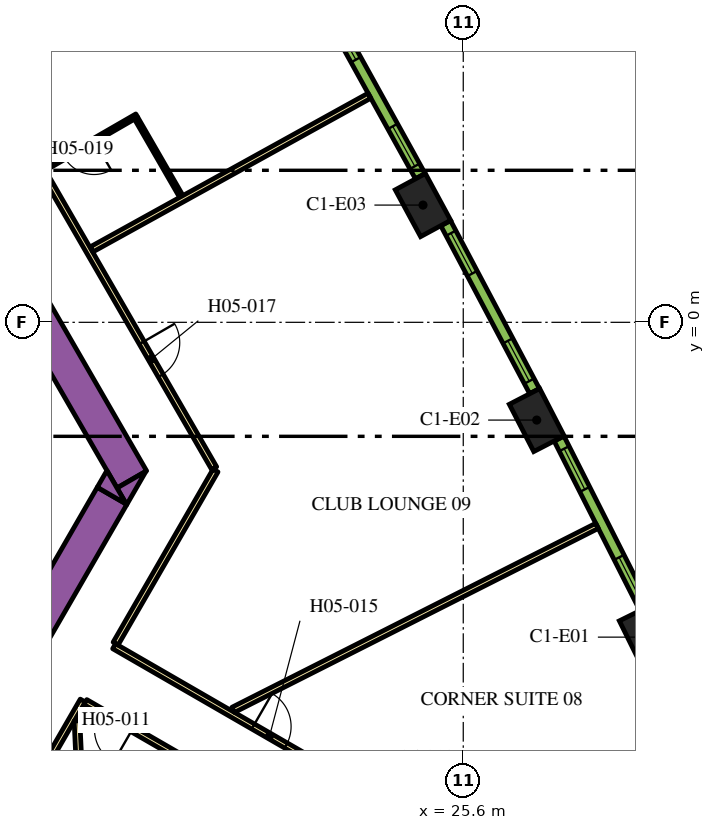
"""IFC4 building model, lengths in metres.
Left out: names, types, materials, properties, quantities, classifications, styles, units other than length and angle.
Written with IfcOpenShell. Run it as: python <this file> out.ifc"""

import sys

from ifc_helpers import new_model, si_unit, direction, frame, frame_2d, origin, origin_2d, place, context, subcontext, project, spatial, polyline, rectangle, outline, extrude, element, fill, save


model = new_model("IFC4")
c1 = context("Model", 3, precision=1e-05, world=origin(), true_north=direction((0.0, 1.0)))
c2 = subcontext(c1, "Body", "Model", "MODEL_VIEW")
j1 = project(units=[si_unit("LENGTHUNIT", "METRE"), si_unit("PLANEANGLEUNIT", "RADIAN")], contexts=[c1])
p1 = place(None, origin())
s1 = spatial("IfcSite", under=j1, at=p1, CompositionType="ELEMENT")
p2 = place(p1, origin())
s2 = spatial("IfcBuilding", under=s1, at=p2, CompositionType="ELEMENT")
p3 = place(p2, frame((0.0, 0.0, 74.4)))
s3 = spatial("IfcBuildingStorey", under=s2, at=p3, CompositionType="ELEMENT", Elevation=74.4)
for number, where, z_axis, x_axis in (
    (1, (30.421, -8.284, 0.0), (0.0, 0.0, 1.0), (-0.443, 0.897, 0.0)),
    (2, (27.533, -2.572, 0.0), (0.0, 0.0, 1.0), (-0.459, 0.888, 0.0)),
    (3, (24.54, 3.085, 0.0), (0.0, 0.0, 1.0), (-0.476, 0.88, 0.0)),
):
    element("IfcColumn", number, at=place(p3, frame(where, z_axis=z_axis, x_axis=x_axis)), inside=s3, PredefinedType="COLUMN", context=c2, shape_type="SweptSolid", body=[
        extrude(rectangle(XDim=1.4, YDim=0.9, at=origin_2d()), origin(), (0.0, 0.0, 1.0), 3.9),
    ])
p4 = place(p3, frame((6.461, 13.909, 0.0), z_axis=(0.0, 0.0, 1.0), x_axis=(0.500005804227, -0.866022052686, 0.0)))
e4 = element("IfcWall", 4, at=p4, inside=s3, PredefinedType="SOLIDWALL", context=c2, shape_type="SweptSolid", body=[
    extrude(rectangle(XDim=20.834, YDim=0.9, at=frame_2d((10.417, 0.0))), origin(), (0.0, 0.0, 1.0), 3.9),
])
p5 = place(p3, origin())
e5 = element("IfcWall", 5, at=p5, inside=s3, PredefinedType="SOLIDWALL", context=c2, shape_type="SweptSolid", body=[
    extrude(outline(polyline([(16.743, -4.8), (16.489, -4.36), (17.251, -3.92), (16.743, -4.8)])), origin(), (0.0, 0.0, 1.0), 3.9),
])
p6 = place(p3, frame((11.695, -12.644, 0.0), z_axis=(0.0, 0.0, 1.0), x_axis=(0.500010229568, 0.86601949766, 0.0)))
e6 = element("IfcWall", 6, at=p6, inside=s3, PredefinedType="SOLIDWALL", context=c2, shape_type="SweptSolid", body=[
    extrude(rectangle(XDim=9.326, YDim=0.9, at=frame_2d((4.663, 0.0))), origin(), (0.0, 0.0, 1.0), 3.9),
])
e7 = element("IfcWall", 7, at=p5, inside=s3, PredefinedType="SOLIDWALL", context=c2, shape_type="SweptSolid", body=[
    extrude(outline(polyline([(16.223, -3.9), (16.732, -4.78), (15.969, -4.34), (16.223, -3.9)])), origin(), (0.0, 0.0, 1.0), 3.9),
])
p7 = place(p3, frame((16.412, -8.523, 0.0), z_axis=(0.0, 0.0, 1.0), x_axis=(0.866022197818, -0.500005552856, 0.0)))
e8 = element("IfcWall", 8, at=p7, inside=s3, PredefinedType="PARTITIONING", context=c2, shape_type="SweptSolid", body=[
    extrude(rectangle(XDim=16.224, YDim=0.15, at=frame_2d((8.112, 0.0))), origin(), (0.0, 0.0, 1.0), 2.7),
])
p8 = place(p7, frame((4.223, 0.0, 0.0)))
e9 = element("IfcOpeningElement", 9, at=p8, cuts=e8, PredefinedType="OPENING", context=c2, shape_type="SweptSolid", body=[
    extrude(rectangle(XDim=1.0, YDim=2.1, at=frame_2d((0.5, 1.05))), frame((0.0, 0.085, 0.0), z_axis=(0.0, -1.0, 0.0), x_axis=(1.0, 0.0, 0.0)), (0.0, 0.0, 1.0), 0.17),
])
p9 = place(p3, frame((19.081, -3.9, 0.0), z_axis=(0.0, 0.0, 1.0), x_axis=(-0.499974327079, -0.866040225545, 0.0)))
e10 = element("IfcWall", 10, at=p9, inside=s3, PredefinedType="PARTITIONING", context=c2, shape_type="SweptSolid", body=[
    extrude(rectangle(XDim=5.258, YDim=0.15, at=frame_2d((2.629, 0.0))), origin(), (0.0, 0.0, 1.0), 2.7),
])
p10 = place(p3, frame((6.163, 18.475, 0.0), z_axis=(0.0, 0.0, 1.0), x_axis=(0.500001317485, -0.866024643133, 0.0)))
e11 = element("IfcWall", 11, at=p10, inside=s3, PredefinedType="PARTITIONING", context=c2, shape_type="SweptSolid", body=[
    extrude(rectangle(XDim=25.767, YDim=0.15, at=frame_2d((12.883, 0.0))), origin(), (0.0, 0.0, 1.0), 2.7),
])
p11 = place(p10, frame((21.953, 0.0, 0.0)))
e12 = element("IfcOpeningElement", 12, at=p11, cuts=e11, PredefinedType="OPENING", context=c2, shape_type="SweptSolid", body=[
    extrude(rectangle(XDim=1.0, YDim=2.1, at=frame_2d((0.5, 1.05))), frame((0.0, 0.085, 0.0), z_axis=(0.0, -1.0, 0.0), x_axis=(1.0, 0.0, 0.0)), (0.0, 0.0, 1.0), 0.17),
])
p12 = place(p10, frame((9.948, 0.0, 0.0)))
e13 = element("IfcOpeningElement", 13, at=p12, cuts=e11, PredefinedType="OPENING", context=c2, shape_type="SweptSolid", body=[
    extrude(rectangle(XDim=1.0, YDim=2.1, at=frame_2d((0.5, 1.05))), frame((0.0, 0.085, 0.0), z_axis=(0.0, -1.0, 0.0), x_axis=(1.0, 0.0, 0.0)), (0.0, 0.0, 1.0), 0.17),
])
p13 = place(p10, frame((8.641, 0.0, 0.0)))
e14 = element("IfcOpeningElement", 14, at=p13, cuts=e11, PredefinedType="OPENING", context=c2, shape_type="SweptSolid", body=[
    extrude(rectangle(XDim=1.0, YDim=2.1, at=frame_2d((0.5, 1.05))), frame((0.0, 0.085, 0.0), z_axis=(0.0, -1.0, 0.0), x_axis=(1.0, 0.0, 0.0)), (0.0, 0.0, 1.0), 0.17),
])
p14 = place(p3, frame((15.587, -9.952, 0.0), z_axis=(0.0, 0.0, 1.0), x_axis=(-0.500016618951, -0.866015808616, 0.0)))
e15 = element("IfcWall", 15, at=p14, inside=s3, PredefinedType="PARTITIONING", context=c2, shape_type="SweptSolid", body=[
    extrude(rectangle(XDim=5.268, YDim=0.15, at=frame_2d((2.634, 0.0))), origin(), (0.0, 0.0, 1.0), 2.7),
])
p15 = place(p3, frame((29.638, -18.064, 0.0), z_axis=(0.0, 0.0, 1.0), x_axis=(-0.866026175601, 0.499998663172, 0.0)))
e16 = element("IfcWall", 16, at=p15, inside=s3, PredefinedType="PARTITIONING", context=c2, shape_type="SweptSolid", body=[
    extrude(rectangle(XDim=16.144, YDim=0.15, at=frame_2d((8.072, 0.0))), origin(), (0.0, 0.0, 1.0), 2.7),
])
p16 = place(p15, frame((14.714, 0.0, 0.0)))
e17 = element("IfcOpeningElement", 17, at=p16, cuts=e16, PredefinedType="OPENING", context=c2, shape_type="SweptSolid", body=[
    extrude(rectangle(XDim=1.0, YDim=2.1, at=frame_2d((0.5, 1.05))), frame((0.0, 0.085, 0.0), z_axis=(0.0, -1.0, 0.0), x_axis=(1.0, 0.0, 0.0)), (0.0, 0.0, 1.0), 0.17),
])
p17 = place(p15, frame((7.275, 0.0, 0.0)))
e18 = element("IfcOpeningElement", 18, at=p17, cuts=e16, PredefinedType="OPENING", context=c2, shape_type="SweptSolid", body=[
    extrude(rectangle(XDim=1.0, YDim=2.1, at=frame_2d((0.5, 1.05))), frame((0.0, 0.085, 0.0), z_axis=(0.0, -1.0, 0.0), x_axis=(1.0, 0.0, 0.0)), (0.0, 0.0, 1.0), 0.17),
])
p18 = place(p3, frame((15.973, -22.109, 0.0), z_axis=(0.0, 0.0, 1.0), x_axis=(-0.046191717129, 0.998932592955, 0.0)))
e19 = element("IfcWall", 19, at=p18, inside=s3, PredefinedType="PARTITIONING", context=c2, shape_type="SweptSolid", body=[
    extrude(rectangle(XDim=11.638, YDim=0.15, at=frame_2d((5.819, 0.0))), origin(), (0.0, 0.0, 1.0), 2.7),
])
p19 = place(p3, frame((23.132, 5.962, 0.0), z_axis=(0.0, 0.0, 1.0), x_axis=(-0.875121716713, -0.483902863121, 0.0)))
e20 = element("IfcWall", 20, at=p19, inside=s3, PredefinedType="PARTITIONING", context=c2, shape_type="SweptSolid", body=[
    extrude(rectangle(XDim=8.355, YDim=0.15, at=frame_2d((4.178, 0.0))), origin(), (0.0, 0.0, 1.0), 2.7),
])
p20 = place(p3, frame((29.12, -5.356, 0.0), z_axis=(0.0, 0.0, 1.0), x_axis=(-0.892401965553, -0.451241323327, 0.0)))
e21 = element("IfcWall", 21, at=p20, inside=s3, PredefinedType="PARTITIONING", context=c2, shape_type="SweptSolid", body=[
    extrude(rectangle(XDim=10.729, YDim=0.15, at=frame_2d((5.364, 0.0))), origin(), (0.0, 0.0, 1.0), 2.7),
])
p21 = place(p3, frame((17.009, 5.439, 0.0), z_axis=(0.0, 0.0, 1.0), x_axis=(-0.865996816683, -0.500049511043, 0.0)))
e22 = element("IfcWall", 22, at=p21, inside=s3, PredefinedType="PARTITIONING", context=c2, shape_type="SweptSolid", body=[
    extrude(rectangle(XDim=2.8, YDim=0.1, at=frame_2d((1.4, 0.0))), origin(), (0.0, 0.0, 1.0), 2.7),
])
p22 = place(p21, frame((1.3, 0.0, 0.0)))
e23 = element("IfcOpeningElement", 23, at=p22, cuts=e22, PredefinedType="OPENING", context=c2, shape_type="SweptSolid", body=[
    extrude(rectangle(XDim=0.9, YDim=2.1, at=frame_2d((0.45, 1.05))), frame((0.0, 0.06, 0.0), z_axis=(0.0, -1.0, 0.0), x_axis=(1.0, 0.0, 0.0)), (0.0, 0.0, 1.0), 0.12),
])
p23 = place(p3, frame((16.991, 5.371, 0.0), z_axis=(0.0, 0.0, 1.0), x_axis=(0.499939447199, -0.866060361138, 0.0)))
e24 = element("IfcWall", 24, at=p23, inside=s3, PredefinedType="PARTITIONING", context=c2, shape_type="SweptSolid", body=[
    extrude(rectangle(XDim=2.37, YDim=0.1, at=frame_2d((1.185, 0.0))), origin(), (0.0, 0.0, 1.0), 2.7),
])
p24 = place(p3, frame((30.377, -7.521, 0.0), z_axis=(0.0, 0.0, 1.0), x_axis=(-0.451233929645, 0.892405704115, 0.0)))
e25 = element("IfcWall", 25, at=p24, inside=s3, PredefinedType="SOLIDWALL", context=c2, shape_type="SweptSolid", body=[
    extrude(rectangle(XDim=4.998, YDim=0.29, at=frame_2d((2.499, 0.0))), origin(), (0.0, 0.0, 1.0), 3.6),
])
p25 = place(p24, frame((0.297, 0.0, 0.9)))
e26 = element("IfcOpeningElement", 26, at=p25, cuts=e25, PredefinedType="OPENING", context=c2, shape_type="SweptSolid", body=[
    extrude(rectangle(XDim=1.2, YDim=2.15, at=frame_2d((0.6, 1.075))), frame((0.0, 0.155, 0.0), z_axis=(0.0, -1.0, 0.0), x_axis=(1.0, 0.0, 0.0)), (0.0, 0.0, 1.0), 0.31),
])
p26 = place(p24, frame((3.501, 0.0, 0.9)))
e27 = element("IfcOpeningElement", 27, at=p26, cuts=e25, PredefinedType="OPENING", context=c2, shape_type="SweptSolid", body=[
    extrude(rectangle(XDim=1.2, YDim=2.15, at=frame_2d((0.6, 1.075))), frame((0.0, 0.155, 0.0), z_axis=(0.0, -1.0, 0.0), x_axis=(1.0, 0.0, 0.0)), (0.0, 0.0, 1.0), 0.31),
])
p27 = place(p3, frame((27.475, -1.81, 0.0), z_axis=(0.0, 0.0, 1.0), x_axis=(-0.467629620899, 0.883924509026, 0.0)))
e28 = element("IfcWall", 28, at=p27, inside=s3, PredefinedType="SOLIDWALL", context=c2, shape_type="SweptSolid", body=[
    extrude(rectangle(XDim=4.998, YDim=0.29, at=frame_2d((2.499, 0.0))), origin(), (0.0, 0.0, 1.0), 3.6),
])
p28 = place(p27, frame((0.297, 0.0, 0.9)))
e29 = element("IfcOpeningElement", 29, at=p28, cuts=e28, PredefinedType="OPENING", context=c2, shape_type="SweptSolid", body=[
    extrude(rectangle(XDim=1.2, YDim=2.15, at=frame_2d((0.6, 1.075))), frame((0.0, 0.155, 0.0), z_axis=(0.0, -1.0, 0.0), x_axis=(1.0, 0.0, 0.0)), (0.0, 0.0, 1.0), 0.31),
])
p29 = place(p27, frame((3.501, 0.0, 0.9)))
e30 = element("IfcOpeningElement", 30, at=p29, cuts=e28, PredefinedType="OPENING", context=c2, shape_type="SweptSolid", body=[
    extrude(rectangle(XDim=1.2, YDim=2.15, at=frame_2d((0.6, 1.075))), frame((0.0, 0.155, 0.0), z_axis=(0.0, -1.0, 0.0), x_axis=(1.0, 0.0, 0.0)), (0.0, 0.0, 1.0), 0.31),
])
p30 = place(p3, frame((24.468, 3.846, 0.0), z_axis=(0.0, 0.0, 1.0), x_axis=(-0.483912572871, 0.875116347589, 0.0)))
e31 = element("IfcWall", 31, at=p30, inside=s3, PredefinedType="SOLIDWALL", context=c2, shape_type="SweptSolid", body=[
    extrude(rectangle(XDim=4.998, YDim=0.29, at=frame_2d((2.499, 0.0))), origin(), (0.0, 0.0, 1.0), 3.6),
])
p31 = place(p30, frame((0.297, 0.0, 0.9)))
e32 = element("IfcOpeningElement", 32, at=p31, cuts=e31, PredefinedType="OPENING", context=c2, shape_type="SweptSolid", body=[
    extrude(rectangle(XDim=1.2, YDim=2.15, at=frame_2d((0.6, 1.075))), frame((0.0, 0.155, 0.0), z_axis=(0.0, -1.0, 0.0), x_axis=(1.0, 0.0, 0.0)), (0.0, 0.0, 1.0), 0.31),
])
p32 = place(p30, frame((3.501, 0.0, 0.9)))
e33 = element("IfcOpeningElement", 33, at=p32, cuts=e31, PredefinedType="OPENING", context=c2, shape_type="SweptSolid", body=[
    extrude(rectangle(XDim=1.2, YDim=2.15, at=frame_2d((0.6, 1.075))), frame((0.0, 0.155, 0.0), z_axis=(0.0, -1.0, 0.0), x_axis=(1.0, 0.0, 0.0)), (0.0, 0.0, 1.0), 0.31),
])
p33 = place(p16, origin())
e34 = element("IfcDoor", 34, at=p33, inside=s3, OperationType="SINGLE_SWING_RIGHT", PredefinedType="DOOR", context=c2, shape_type="SweptSolid", body=[
    extrude(rectangle(XDim=1.0, YDim=2.1, at=frame_2d((0.5, 1.05))), frame((0.0, 0.025, 0.0), z_axis=(0.0, -1.0, 0.0), x_axis=(1.0, 0.0, 0.0)), (0.0, 0.0, 1.0), 0.05),
])
fill(e17, e34)
p34 = place(p8, origin())
e35 = element("IfcDoor", 35, at=p34, inside=s3, OperationType="SINGLE_SWING_LEFT", PredefinedType="DOOR", context=c2, shape_type="SweptSolid", body=[
    extrude(rectangle(XDim=1.0, YDim=2.1, at=frame_2d((0.5, 1.05))), frame((0.0, 0.025, 0.0), z_axis=(0.0, -1.0, 0.0), x_axis=(1.0, 0.0, 0.0)), (0.0, 0.0, 1.0), 0.05),
])
fill(e9, e35)
p35 = place(p11, origin())
e36 = element("IfcDoor", 36, at=p35, inside=s3, OperationType="SINGLE_SWING_LEFT", PredefinedType="DOOR", context=c2, shape_type="SweptSolid", body=[
    extrude(rectangle(XDim=1.0, YDim=2.1, at=frame_2d((0.5, 1.05))), frame((0.0, 0.025, 0.0), z_axis=(0.0, -1.0, 0.0), x_axis=(1.0, 0.0, 0.0)), (0.0, 0.0, 1.0), 0.05),
])
fill(e12, e36)
p36 = place(p22, origin())
e37 = element("IfcDoor", 37, at=p36, inside=s3, OperationType="SINGLE_SWING_LEFT", PredefinedType="DOOR", context=c2, shape_type="SweptSolid", body=[
    extrude(rectangle(XDim=0.9, YDim=2.1, at=frame_2d((0.45, 1.05))), frame((0.0, 0.025, 0.0), z_axis=(0.0, -1.0, 0.0), x_axis=(1.0, 0.0, 0.0)), (0.0, 0.0, 1.0), 0.05),
])
fill(e23, e37)
p37 = place(p25, origin())
e38 = element("IfcWindow", 38, at=p37, inside=s3, PartitioningType="DOUBLE_PANEL_VERTICAL", PredefinedType="WINDOW", context=c2, shape_type="SweptSolid", body=[
    extrude(rectangle(XDim=1.2, YDim=2.15, at=frame_2d((0.6, 1.075))), frame((0.0, 0.015, 0.0), z_axis=(0.0, -1.0, 0.0), x_axis=(1.0, 0.0, 0.0)), (0.0, 0.0, 1.0), 0.06),
])
fill(e26, e38)
p38 = place(p26, origin())
e39 = element("IfcWindow", 39, at=p38, inside=s3, PartitioningType="DOUBLE_PANEL_VERTICAL", PredefinedType="WINDOW", context=c2, shape_type="SweptSolid", body=[
    extrude(rectangle(XDim=1.2, YDim=2.15, at=frame_2d((0.6, 1.075))), frame((0.0, 0.015, 0.0), z_axis=(0.0, -1.0, 0.0), x_axis=(1.0, 0.0, 0.0)), (0.0, 0.0, 1.0), 0.06),
])
fill(e27, e39)
p39 = place(p28, origin())
e40 = element("IfcWindow", 40, at=p39, inside=s3, PartitioningType="DOUBLE_PANEL_VERTICAL", PredefinedType="WINDOW", context=c2, shape_type="SweptSolid", body=[
    extrude(rectangle(XDim=1.2, YDim=2.15, at=frame_2d((0.6, 1.075))), frame((0.0, 0.015, 0.0), z_axis=(0.0, -1.0, 0.0), x_axis=(1.0, 0.0, 0.0)), (0.0, 0.0, 1.0), 0.06),
])
fill(e29, e40)
p40 = place(p29, origin())
e41 = element("IfcWindow", 41, at=p40, inside=s3, PartitioningType="DOUBLE_PANEL_VERTICAL", PredefinedType="WINDOW", context=c2, shape_type="SweptSolid", body=[
    extrude(rectangle(XDim=1.2, YDim=2.15, at=frame_2d((0.6, 1.075))), frame((0.0, 0.015, 0.0), z_axis=(0.0, -1.0, 0.0), x_axis=(1.0, 0.0, 0.0)), (0.0, 0.0, 1.0), 0.06),
])
fill(e30, e41)
p41 = place(p31, origin())
e42 = element("IfcWindow", 42, at=p41, inside=s3, PartitioningType="DOUBLE_PANEL_VERTICAL", PredefinedType="WINDOW", context=c2, shape_type="SweptSolid", body=[
    extrude(rectangle(XDim=1.2, YDim=2.15, at=frame_2d((0.6, 1.075))), frame((0.0, 0.015, 0.0), z_axis=(0.0, -1.0, 0.0), x_axis=(1.0, 0.0, 0.0)), (0.0, 0.0, 1.0), 0.06),
])
fill(e32, e42)
p42 = place(p32, origin())
e43 = element("IfcWindow", 43, at=p42, inside=s3, PartitioningType="DOUBLE_PANEL_VERTICAL", PredefinedType="WINDOW", context=c2, shape_type="SweptSolid", body=[
    extrude(rectangle(XDim=1.2, YDim=2.15, at=frame_2d((0.6, 1.075))), frame((0.0, 0.015, 0.0), z_axis=(0.0, -1.0, 0.0), x_axis=(1.0, 0.0, 0.0)), (0.0, 0.0, 1.0), 0.06),
])
fill(e33, e43)
save(model, sys.argv[1])
